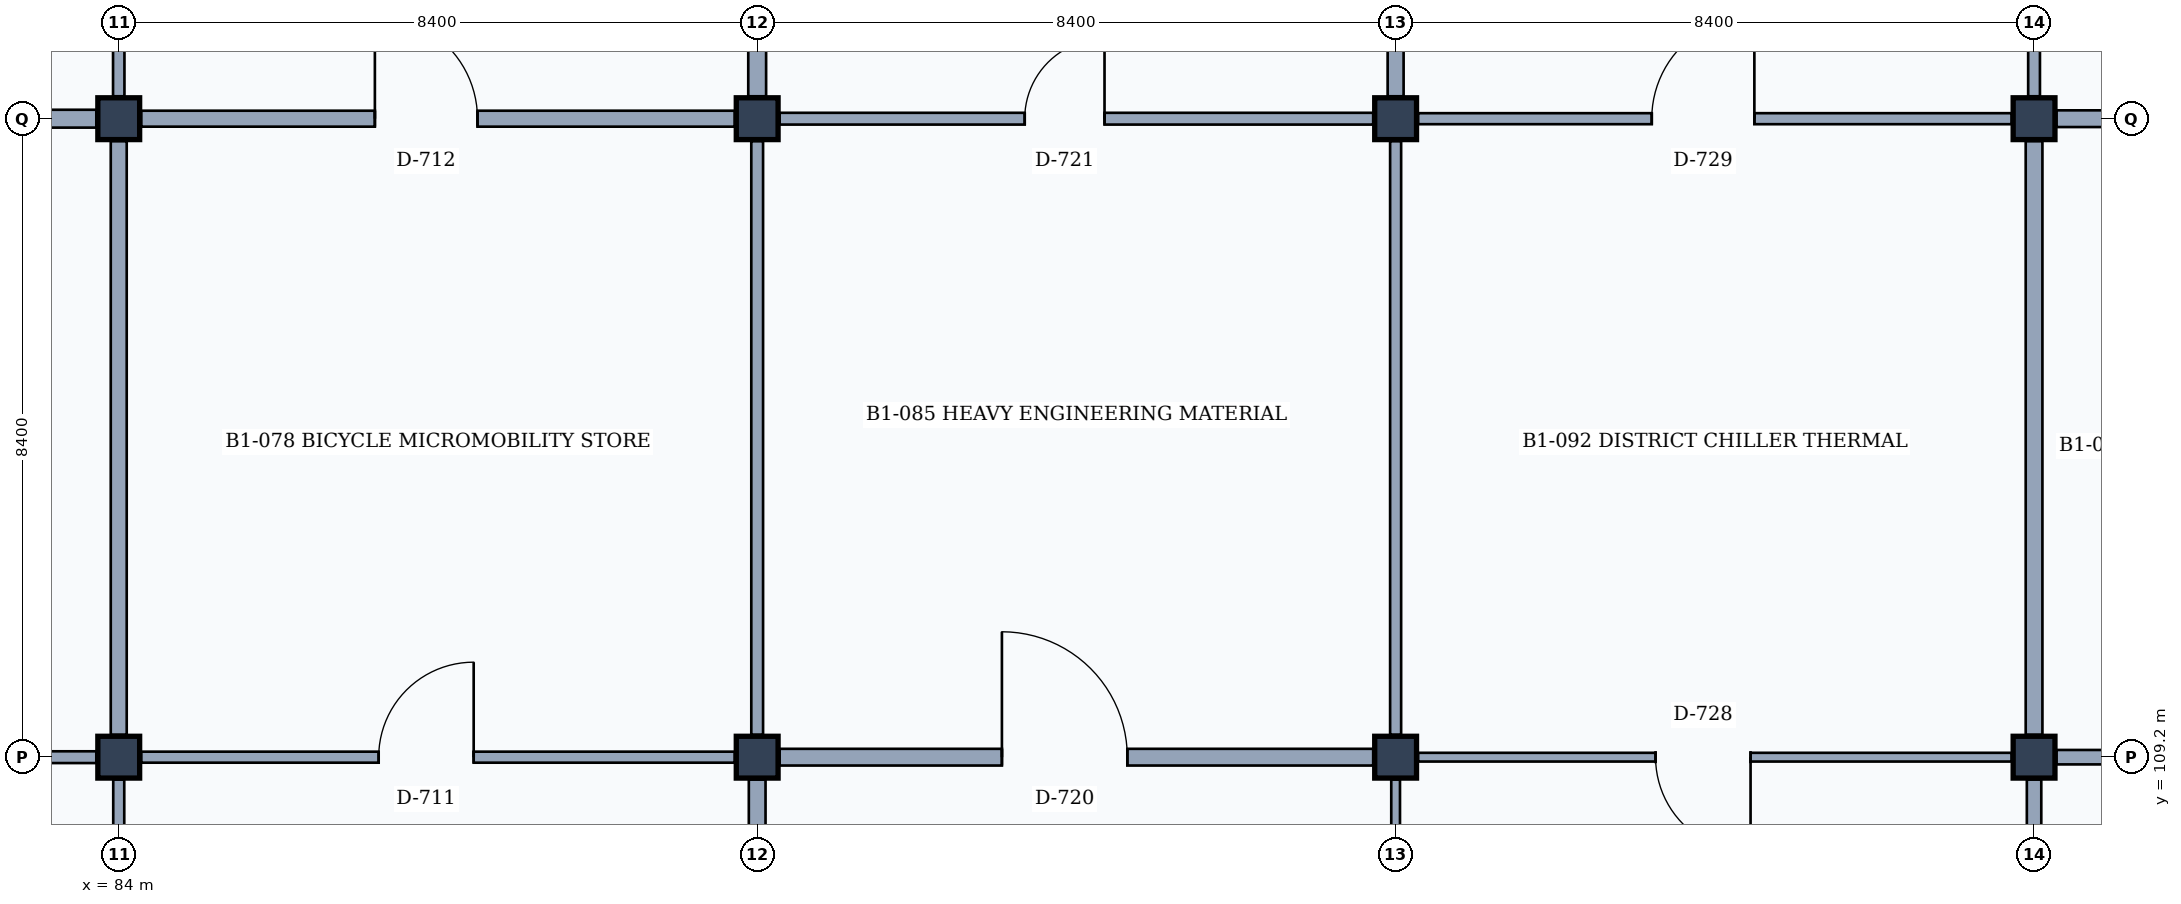
"""IFC4 building model, lengths in metres.
Left out: names, types, materials, properties, quantities, classifications, styles, units other than length and angle.
Written with IfcOpenShell. Run it as: python <this file> out.ifc"""

import sys

from ifc_helpers import new_model, si_unit, direction, frame, frame_2d, origin, origin_2d, place, context, subcontext, project, spatial, rectangle, extrude, element, fill, save


model = new_model("IFC4")
c1 = context("Model", 3, precision=1e-05, world=origin(), true_north=direction((0.0, 1.0)))
c2 = subcontext(c1, "Body", "Model", "MODEL_VIEW")
j1 = project(units=[si_unit("LENGTHUNIT", "METRE"), si_unit("PLANEANGLEUNIT", "RADIAN")], contexts=[c1])
p1 = place(None, origin())
s1 = spatial("IfcSite", under=j1, at=p1, CompositionType="ELEMENT")
p2 = place(p1, origin())
s2 = spatial("IfcBuilding", under=s1, at=p2, CompositionType="ELEMENT")
p3 = place(p2, frame((0.0, 0.0, -4.2)))
s3 = spatial("IfcBuildingStorey", under=s2, at=p3, CompositionType="ELEMENT", Elevation=-4.2)
for number, where, z_axis, x_axis in (
    (1, (84.0, 109.2, 0.0), (0.0, 0.0, 1.0), (1.0, 0.0, 0.0)),
    (2, (84.0, 117.6, 0.0), (0.0, 0.0, 1.0), (1.0, 0.0, 0.0)),
    (3, (92.4, 109.2, 0.0), (0.0, 0.0, 1.0), (1.0, 0.0, 0.0)),
    (4, (92.4, 117.6, 0.0), (0.0, 0.0, 1.0), (1.0, 0.0, 0.0)),
    (5, (100.8, 109.2, 0.0), (0.0, 0.0, 1.0), (1.0, 0.0, 0.0)),
    (6, (100.8, 117.6, 0.0), (0.0, 0.0, 1.0), (1.0, 0.0, 0.0)),
    (7, (109.2, 109.2, 0.0), (0.0, 0.0, 1.0), (1.0, 0.0, 0.0)),
    (8, (109.2, 117.6, 0.0), (0.0, 0.0, 1.0), (1.0, 0.0, 0.0)),
):
    element("IfcColumn", number, at=place(p3, frame(where, z_axis=z_axis, x_axis=x_axis)), inside=s3, PredefinedType="COLUMN", context=c2, shape_type="SweptSolid", body=[
        extrude(rectangle(XDim=0.55, YDim=0.55, at=origin_2d()), origin(), (0.0, 0.0, 1.0), 4.2),
    ])
p4 = place(p3, frame((84.0, 101.095, 0.0), z_axis=(0.0, 0.0, 1.0), x_axis=(0.0, 1.0, 0.0)))
e9 = element("IfcWall", 9, at=p4, inside=s3, PredefinedType="PARTITIONING", context=c2, shape_type="SweptSolid", body=[
    extrude(rectangle(XDim=7.81, YDim=0.145, at=frame_2d((3.905, 0.0))), origin(), (0.0, 0.0, 1.0), 3.23),
])
p5 = place(p4, frame((3.05, 0.0, 0.0)))
e10 = element("IfcOpeningElement", 10, at=p5, cuts=e9, PredefinedType="OPENING", context=c2, shape_type="SweptSolid", body=[
    extrude(rectangle(XDim=1.4, YDim=2.25, at=frame_2d((0.7, 1.125))), frame((0.0, 0.083, 0.0), z_axis=(0.0, -1.0, 0.0), x_axis=(1.0, 0.0, 0.0)), (0.0, 0.0, 1.0), 0.165),
])
p6 = place(p3, frame((75.895, 109.2, 0.0), z_axis=(0.0, 0.0, 1.0), x_axis=(1.0, 0.0, 0.0)))
e11 = element("IfcWall", 11, at=p6, inside=s3, PredefinedType="PARTITIONING", context=c2, shape_type="SweptSolid", body=[
    extrude(rectangle(XDim=7.81, YDim=0.155, at=frame_2d((3.905, 0.0))), origin(), (0.0, 0.0, 1.0), 2.93),
])
p7 = place(p6, frame((3.0, 0.0, 0.0)))
e12 = element("IfcOpeningElement", 12, at=p7, cuts=e11, PredefinedType="OPENING", context=c2, shape_type="SweptSolid", body=[
    extrude(rectangle(XDim=1.5, YDim=2.3, at=frame_2d((0.75, 1.15))), frame((0.0, 0.087, 0.0), z_axis=(0.0, -1.0, 0.0), x_axis=(1.0, 0.0, 0.0)), (0.0, 0.0, 1.0), 0.175),
])
p8 = place(p3, frame((84.0, 109.495, 0.0), z_axis=(0.0, 0.0, 1.0), x_axis=(0.0, 1.0, 0.0)))
e13 = element("IfcWall", 13, at=p8, inside=s3, PredefinedType="PARTITIONING", context=c2, shape_type="SweptSolid", body=[
    extrude(rectangle(XDim=7.81, YDim=0.21, at=frame_2d((3.905, 0.0))), origin(), (0.0, 0.0, 1.0), 3.23),
])
p9 = place(p3, frame((75.895, 117.6, 0.0), z_axis=(0.0, 0.0, 1.0), x_axis=(1.0, 0.0, 0.0)))
e14 = element("IfcWall", 14, at=p9, inside=s3, PredefinedType="PARTITIONING", context=c2, shape_type="SweptSolid", body=[
    extrude(rectangle(XDim=7.81, YDim=0.235, at=frame_2d((3.905, 0.0))), origin(), (0.0, 0.0, 1.0), 2.93),
])
p10 = place(p9, frame((2.925, 0.0, 0.0)))
e15 = element("IfcOpeningElement", 15, at=p10, cuts=e14, PredefinedType="OPENING", context=c2, shape_type="SweptSolid", body=[
    extrude(rectangle(XDim=1.65, YDim=2.25, at=frame_2d((0.825, 1.125))), frame((0.0, 0.127, 0.0), z_axis=(0.0, -1.0, 0.0), x_axis=(1.0, 0.0, 0.0)), (0.0, 0.0, 1.0), 0.255),
])
p11 = place(p3, frame((84.0, 117.895, 0.0), z_axis=(0.0, 0.0, 1.0), x_axis=(0.0, 1.0, 0.0)))
e16 = element("IfcWall", 16, at=p11, inside=s3, PredefinedType="PARTITIONING", context=c2, shape_type="SweptSolid", body=[
    extrude(rectangle(XDim=7.81, YDim=0.15, at=frame_2d((3.905, 0.0))), origin(), (0.0, 0.0, 1.0), 3.23),
])
p12 = place(p3, frame((92.4, 101.095, 0.0), z_axis=(0.0, 0.0, 1.0), x_axis=(0.0, 1.0, 0.0)))
e17 = element("IfcWall", 17, at=p12, inside=s3, PredefinedType="PARTITIONING", context=c2, shape_type="SweptSolid", body=[
    extrude(rectangle(XDim=7.81, YDim=0.22, at=frame_2d((3.905, 0.0))), origin(), (0.0, 0.0, 1.0), 3.23),
])
p13 = place(p12, frame((3.3, 0.0, 0.0)))
e18 = element("IfcOpeningElement", 18, at=p13, cuts=e17, PredefinedType="OPENING", context=c2, shape_type="SweptSolid", body=[
    extrude(rectangle(XDim=0.9, YDim=2.1, at=frame_2d((0.45, 1.05))), frame((0.0, 0.12, 0.0), z_axis=(0.0, -1.0, 0.0), x_axis=(1.0, 0.0, 0.0)), (0.0, 0.0, 1.0), 0.24),
])
p14 = place(p3, frame((84.295, 109.2, 0.0), z_axis=(0.0, 0.0, 1.0), x_axis=(1.0, 0.0, 0.0)))
e19 = element("IfcWall", 19, at=p14, inside=s3, PredefinedType="PARTITIONING", context=c2, shape_type="SweptSolid", body=[
    extrude(rectangle(XDim=7.81, YDim=0.145, at=frame_2d((3.905, 0.0))), origin(), (0.0, 0.0, 1.0), 2.93),
])
p15 = place(p14, frame((3.125, 0.0, 0.0)))
e20 = element("IfcOpeningElement", 20, at=p15, cuts=e19, PredefinedType="OPENING", context=c2, shape_type="SweptSolid", body=[
    extrude(rectangle(XDim=1.25, YDim=2.3, at=frame_2d((0.625, 1.15))), frame((0.0, 0.083, 0.0), z_axis=(0.0, -1.0, 0.0), x_axis=(1.0, 0.0, 0.0)), (0.0, 0.0, 1.0), 0.165),
])
p16 = place(p3, frame((92.4, 109.495, 0.0), z_axis=(0.0, 0.0, 1.0), x_axis=(0.0, 1.0, 0.0)))
e21 = element("IfcWall", 21, at=p16, inside=s3, PredefinedType="PARTITIONING", context=c2, shape_type="SweptSolid", body=[
    extrude(rectangle(XDim=7.81, YDim=0.155, at=frame_2d((3.905, 0.0))), origin(), (0.0, 0.0, 1.0), 3.23),
])
p17 = place(p3, frame((84.295, 117.6, 0.0), z_axis=(0.0, 0.0, 1.0), x_axis=(1.0, 0.0, 0.0)))
e22 = element("IfcWall", 22, at=p17, inside=s3, PredefinedType="PARTITIONING", context=c2, shape_type="SweptSolid", body=[
    extrude(rectangle(XDim=7.81, YDim=0.21, at=frame_2d((3.905, 0.0))), origin(), (0.0, 0.0, 1.0), 2.93),
])
p18 = place(p17, frame((3.075, 0.0, 0.0)))
e23 = element("IfcOpeningElement", 23, at=p18, cuts=e22, PredefinedType="OPENING", context=c2, shape_type="SweptSolid", body=[
    extrude(rectangle(XDim=1.35, YDim=2.25, at=frame_2d((0.675, 1.125))), frame((0.0, 0.115, 0.0), z_axis=(0.0, -1.0, 0.0), x_axis=(1.0, 0.0, 0.0)), (0.0, 0.0, 1.0), 0.23),
])
p19 = place(p3, frame((92.4, 117.895, 0.0), z_axis=(0.0, 0.0, 1.0), x_axis=(0.0, 1.0, 0.0)))
e24 = element("IfcWall", 24, at=p19, inside=s3, PredefinedType="PARTITIONING", context=c2, shape_type="SweptSolid", body=[
    extrude(rectangle(XDim=7.81, YDim=0.235, at=frame_2d((3.905, 0.0))), origin(), (0.0, 0.0, 1.0), 3.23),
])
p20 = place(p3, frame((100.8, 101.095, 0.0), z_axis=(0.0, 0.0, 1.0), x_axis=(0.0, 1.0, 0.0)))
e25 = element("IfcWall", 25, at=p20, inside=s3, PredefinedType="PARTITIONING", context=c2, shape_type="SweptSolid", body=[
    extrude(rectangle(XDim=7.81, YDim=0.115, at=frame_2d((3.905, 0.0))), origin(), (0.0, 0.0, 1.0), 3.23),
])
p21 = place(p20, frame((3.0, 0.0, 0.0)))
e26 = element("IfcOpeningElement", 26, at=p21, cuts=e25, PredefinedType="OPENING", context=c2, shape_type="SweptSolid", body=[
    extrude(rectangle(XDim=1.5, YDim=2.3, at=frame_2d((0.75, 1.15))), frame((0.0, 0.067, 0.0), z_axis=(0.0, -1.0, 0.0), x_axis=(1.0, 0.0, 0.0)), (0.0, 0.0, 1.0), 0.135),
])
p22 = place(p3, frame((92.695, 109.2, 0.0), z_axis=(0.0, 0.0, 1.0), x_axis=(1.0, 0.0, 0.0)))
e27 = element("IfcWall", 27, at=p22, inside=s3, PredefinedType="PARTITIONING", context=c2, shape_type="SweptSolid", body=[
    extrude(rectangle(XDim=7.81, YDim=0.22, at=frame_2d((3.905, 0.0))), origin(), (0.0, 0.0, 1.0), 2.93),
])
p23 = place(p22, frame((2.925, 0.0, 0.0)))
e28 = element("IfcOpeningElement", 28, at=p23, cuts=e27, PredefinedType="OPENING", context=c2, shape_type="SweptSolid", body=[
    extrude(rectangle(XDim=1.65, YDim=2.25, at=frame_2d((0.825, 1.125))), frame((0.0, 0.12, 0.0), z_axis=(0.0, -1.0, 0.0), x_axis=(1.0, 0.0, 0.0)), (0.0, 0.0, 1.0), 0.24),
])
p24 = place(p3, frame((100.8, 109.495, 0.0), z_axis=(0.0, 0.0, 1.0), x_axis=(0.0, 1.0, 0.0)))
e29 = element("IfcWall", 29, at=p24, inside=s3, PredefinedType="PARTITIONING", context=c2, shape_type="SweptSolid", body=[
    extrude(rectangle(XDim=7.81, YDim=0.145, at=frame_2d((3.905, 0.0))), origin(), (0.0, 0.0, 1.0), 3.23),
])
p25 = place(p3, frame((92.695, 117.6, 0.0), z_axis=(0.0, 0.0, 1.0), x_axis=(1.0, 0.0, 0.0)))
e30 = element("IfcWall", 30, at=p25, inside=s3, PredefinedType="PARTITIONING", context=c2, shape_type="SweptSolid", body=[
    extrude(rectangle(XDim=7.81, YDim=0.155, at=frame_2d((3.905, 0.0))), origin(), (0.0, 0.0, 1.0), 2.93),
])
p26 = place(p25, frame((3.225, 0.0, 0.0)))
e31 = element("IfcOpeningElement", 31, at=p26, cuts=e30, PredefinedType="OPENING", context=c2, shape_type="SweptSolid", body=[
    extrude(rectangle(XDim=1.05, YDim=2.2, at=frame_2d((0.525, 1.1))), frame((0.0, 0.087, 0.0), z_axis=(0.0, -1.0, 0.0), x_axis=(1.0, 0.0, 0.0)), (0.0, 0.0, 1.0), 0.175),
])
p27 = place(p3, frame((100.8, 117.895, 0.0), z_axis=(0.0, 0.0, 1.0), x_axis=(0.0, 1.0, 0.0)))
e32 = element("IfcWall", 32, at=p27, inside=s3, PredefinedType="PARTITIONING", context=c2, shape_type="SweptSolid", body=[
    extrude(rectangle(XDim=7.81, YDim=0.21, at=frame_2d((3.905, 0.0))), origin(), (0.0, 0.0, 1.0), 3.23),
])
p28 = place(p3, frame((109.2, 101.095, 0.0), z_axis=(0.0, 0.0, 1.0), x_axis=(0.0, 1.0, 0.0)))
e33 = element("IfcWall", 33, at=p28, inside=s3, PredefinedType="PARTITIONING", context=c2, shape_type="SweptSolid", body=[
    extrude(rectangle(XDim=7.81, YDim=0.19, at=frame_2d((3.905, 0.0))), origin(), (0.0, 0.0, 1.0), 3.23),
])
p29 = place(p28, frame((3.3, 0.0, 0.0)))
e34 = element("IfcOpeningElement", 34, at=p29, cuts=e33, PredefinedType="OPENING", context=c2, shape_type="SweptSolid", body=[
    extrude(rectangle(XDim=0.9, YDim=2.1, at=frame_2d((0.45, 1.05))), frame((0.0, 0.105, 0.0), z_axis=(0.0, -1.0, 0.0), x_axis=(1.0, 0.0, 0.0)), (0.0, 0.0, 1.0), 0.21),
])
p30 = place(p3, frame((101.095, 109.2, 0.0), z_axis=(0.0, 0.0, 1.0), x_axis=(1.0, 0.0, 0.0)))
e35 = element("IfcWall", 35, at=p30, inside=s3, PredefinedType="PARTITIONING", context=c2, shape_type="SweptSolid", body=[
    extrude(rectangle(XDim=7.81, YDim=0.115, at=frame_2d((3.905, 0.0))), origin(), (0.0, 0.0, 1.0), 2.93),
])
p31 = place(p30, frame((3.125, 0.0, 0.0)))
e36 = element("IfcOpeningElement", 36, at=p31, cuts=e35, PredefinedType="OPENING", context=c2, shape_type="SweptSolid", body=[
    extrude(rectangle(XDim=1.25, YDim=2.3, at=frame_2d((0.625, 1.15))), frame((0.0, 0.067, 0.0), z_axis=(0.0, -1.0, 0.0), x_axis=(1.0, 0.0, 0.0)), (0.0, 0.0, 1.0), 0.135),
])
p32 = place(p3, frame((109.2, 109.495, 0.0), z_axis=(0.0, 0.0, 1.0), x_axis=(0.0, 1.0, 0.0)))
e37 = element("IfcWall", 37, at=p32, inside=s3, PredefinedType="PARTITIONING", context=c2, shape_type="SweptSolid", body=[
    extrude(rectangle(XDim=7.81, YDim=0.22, at=frame_2d((3.905, 0.0))), origin(), (0.0, 0.0, 1.0), 3.23),
])
p33 = place(p3, frame((101.095, 117.6, 0.0), z_axis=(0.0, 0.0, 1.0), x_axis=(1.0, 0.0, 0.0)))
e38 = element("IfcWall", 38, at=p33, inside=s3, PredefinedType="PARTITIONING", context=c2, shape_type="SweptSolid", body=[
    extrude(rectangle(XDim=7.81, YDim=0.145, at=frame_2d((3.905, 0.0))), origin(), (0.0, 0.0, 1.0), 2.93),
])
p34 = place(p33, frame((3.075, 0.0, 0.0)))
e39 = element("IfcOpeningElement", 39, at=p34, cuts=e38, PredefinedType="OPENING", context=c2, shape_type="SweptSolid", body=[
    extrude(rectangle(XDim=1.35, YDim=2.25, at=frame_2d((0.675, 1.125))), frame((0.0, 0.083, 0.0), z_axis=(0.0, -1.0, 0.0), x_axis=(1.0, 0.0, 0.0)), (0.0, 0.0, 1.0), 0.165),
])
p35 = place(p3, frame((109.2, 117.895, 0.0), z_axis=(0.0, 0.0, 1.0), x_axis=(0.0, 1.0, 0.0)))
e40 = element("IfcWall", 40, at=p35, inside=s3, PredefinedType="PARTITIONING", context=c2, shape_type="SweptSolid", body=[
    extrude(rectangle(XDim=7.81, YDim=0.155, at=frame_2d((3.905, 0.0))), origin(), (0.0, 0.0, 1.0), 3.23),
])
p36 = place(p3, frame((109.495, 109.2, 0.0), z_axis=(0.0, 0.0, 1.0), x_axis=(1.0, 0.0, 0.0)))
e41 = element("IfcWall", 41, at=p36, inside=s3, PredefinedType="PARTITIONING", context=c2, shape_type="SweptSolid", body=[
    extrude(rectangle(XDim=7.76, YDim=0.19, at=frame_2d((3.88, 0.0))), origin(), (0.0, 0.0, 1.0), 2.93),
])
p37 = place(p36, frame((3.15, 0.0, 0.0)))
e42 = element("IfcOpeningElement", 42, at=p37, cuts=e41, PredefinedType="OPENING", context=c2, shape_type="SweptSolid", body=[
    extrude(rectangle(XDim=1.2, YDim=2.2, at=frame_2d((0.6, 1.1))), frame((0.0, 0.105, 0.0), z_axis=(0.0, -1.0, 0.0), x_axis=(1.0, 0.0, 0.0)), (0.0, 0.0, 1.0), 0.21),
])
p38 = place(p3, frame((109.495, 117.6, 0.0), z_axis=(0.0, 0.0, 1.0), x_axis=(1.0, 0.0, 0.0)))
e43 = element("IfcWall", 43, at=p38, inside=s3, PredefinedType="PARTITIONING", context=c2, shape_type="SweptSolid", body=[
    extrude(rectangle(XDim=7.76, YDim=0.22, at=frame_2d((3.88, 0.0))), origin(), (0.0, 0.0, 1.0), 2.93),
])
p39 = place(p38, frame((3.05, 0.0, 0.0)))
e44 = element("IfcOpeningElement", 44, at=p39, cuts=e43, PredefinedType="OPENING", context=c2, shape_type="SweptSolid", body=[
    extrude(rectangle(XDim=1.4, YDim=2.25, at=frame_2d((0.7, 1.125))), frame((0.0, 0.12, 0.0), z_axis=(0.0, -1.0, 0.0), x_axis=(1.0, 0.0, 0.0)), (0.0, 0.0, 1.0), 0.24),
])
p40 = place(p15, origin())
e45 = element("IfcDoor", 45, at=p40, inside=s3, OperationType="SINGLE_SWING_RIGHT", PredefinedType="DOOR", context=c2, shape_type="SweptSolid", body=[
    extrude(rectangle(XDim=1.25, YDim=2.3, at=frame_2d((0.625, 1.15))), frame((0.0, 0.025, 0.0), z_axis=(0.0, -1.0, 0.0), x_axis=(1.0, 0.0, 0.0)), (0.0, 0.0, 1.0), 0.05),
])
fill(e20, e45)
p41 = place(p18, origin())
e46 = element("IfcDoor", 46, at=p41, inside=s3, OperationType="SINGLE_SWING_LEFT", PredefinedType="DOOR", context=c2, shape_type="SweptSolid", body=[
    extrude(rectangle(XDim=1.35, YDim=2.25, at=frame_2d((0.675, 1.125))), frame((0.0, 0.025, 0.0), z_axis=(0.0, -1.0, 0.0), x_axis=(1.0, 0.0, 0.0)), (0.0, 0.0, 1.0), 0.05),
])
fill(e23, e46)
p42 = place(p23, origin())
e47 = element("IfcDoor", 47, at=p42, inside=s3, OperationType="SINGLE_SWING_LEFT", PredefinedType="DOOR", context=c2, shape_type="SweptSolid", body=[
    extrude(rectangle(XDim=1.65, YDim=2.25, at=frame_2d((0.825, 1.125))), frame((0.0, 0.025, 0.0), z_axis=(0.0, -1.0, 0.0), x_axis=(1.0, 0.0, 0.0)), (0.0, 0.0, 1.0), 0.05),
])
fill(e28, e47)
p43 = place(p26, origin())
e48 = element("IfcDoor", 48, at=p43, inside=s3, OperationType="SINGLE_SWING_RIGHT", PredefinedType="DOOR", context=c2, shape_type="SweptSolid", body=[
    extrude(rectangle(XDim=1.05, YDim=2.2, at=frame_2d((0.525, 1.1))), frame((0.0, 0.025, 0.0), z_axis=(0.0, -1.0, 0.0), x_axis=(1.0, 0.0, 0.0)), (0.0, 0.0, 1.0), 0.05),
])
fill(e31, e48)
p44 = place(p31, frame((1.25, 0.0, 0.0), z_axis=(0.0, 0.0, 1.0), x_axis=(-1.0, 0.0, 0.0)))
e49 = element("IfcDoor", 49, at=p44, inside=s3, OperationType="SINGLE_SWING_LEFT", PredefinedType="DOOR", context=c2, shape_type="SweptSolid", body=[
    extrude(rectangle(XDim=1.25, YDim=2.3, at=frame_2d((0.625, 1.15))), frame((0.0, 0.025, 0.0), z_axis=(0.0, -1.0, 0.0), x_axis=(1.0, 0.0, 0.0)), (0.0, 0.0, 1.0), 0.05),
])
fill(e36, e49)
p45 = place(p34, origin())
e50 = element("IfcDoor", 50, at=p45, inside=s3, OperationType="SINGLE_SWING_RIGHT", PredefinedType="DOOR", context=c2, shape_type="SweptSolid", body=[
    extrude(rectangle(XDim=1.35, YDim=2.25, at=frame_2d((0.675, 1.125))), frame((0.0, 0.025, 0.0), z_axis=(0.0, -1.0, 0.0), x_axis=(1.0, 0.0, 0.0)), (0.0, 0.0, 1.0), 0.05),
])
fill(e39, e50)
save(model, sys.argv[1])
